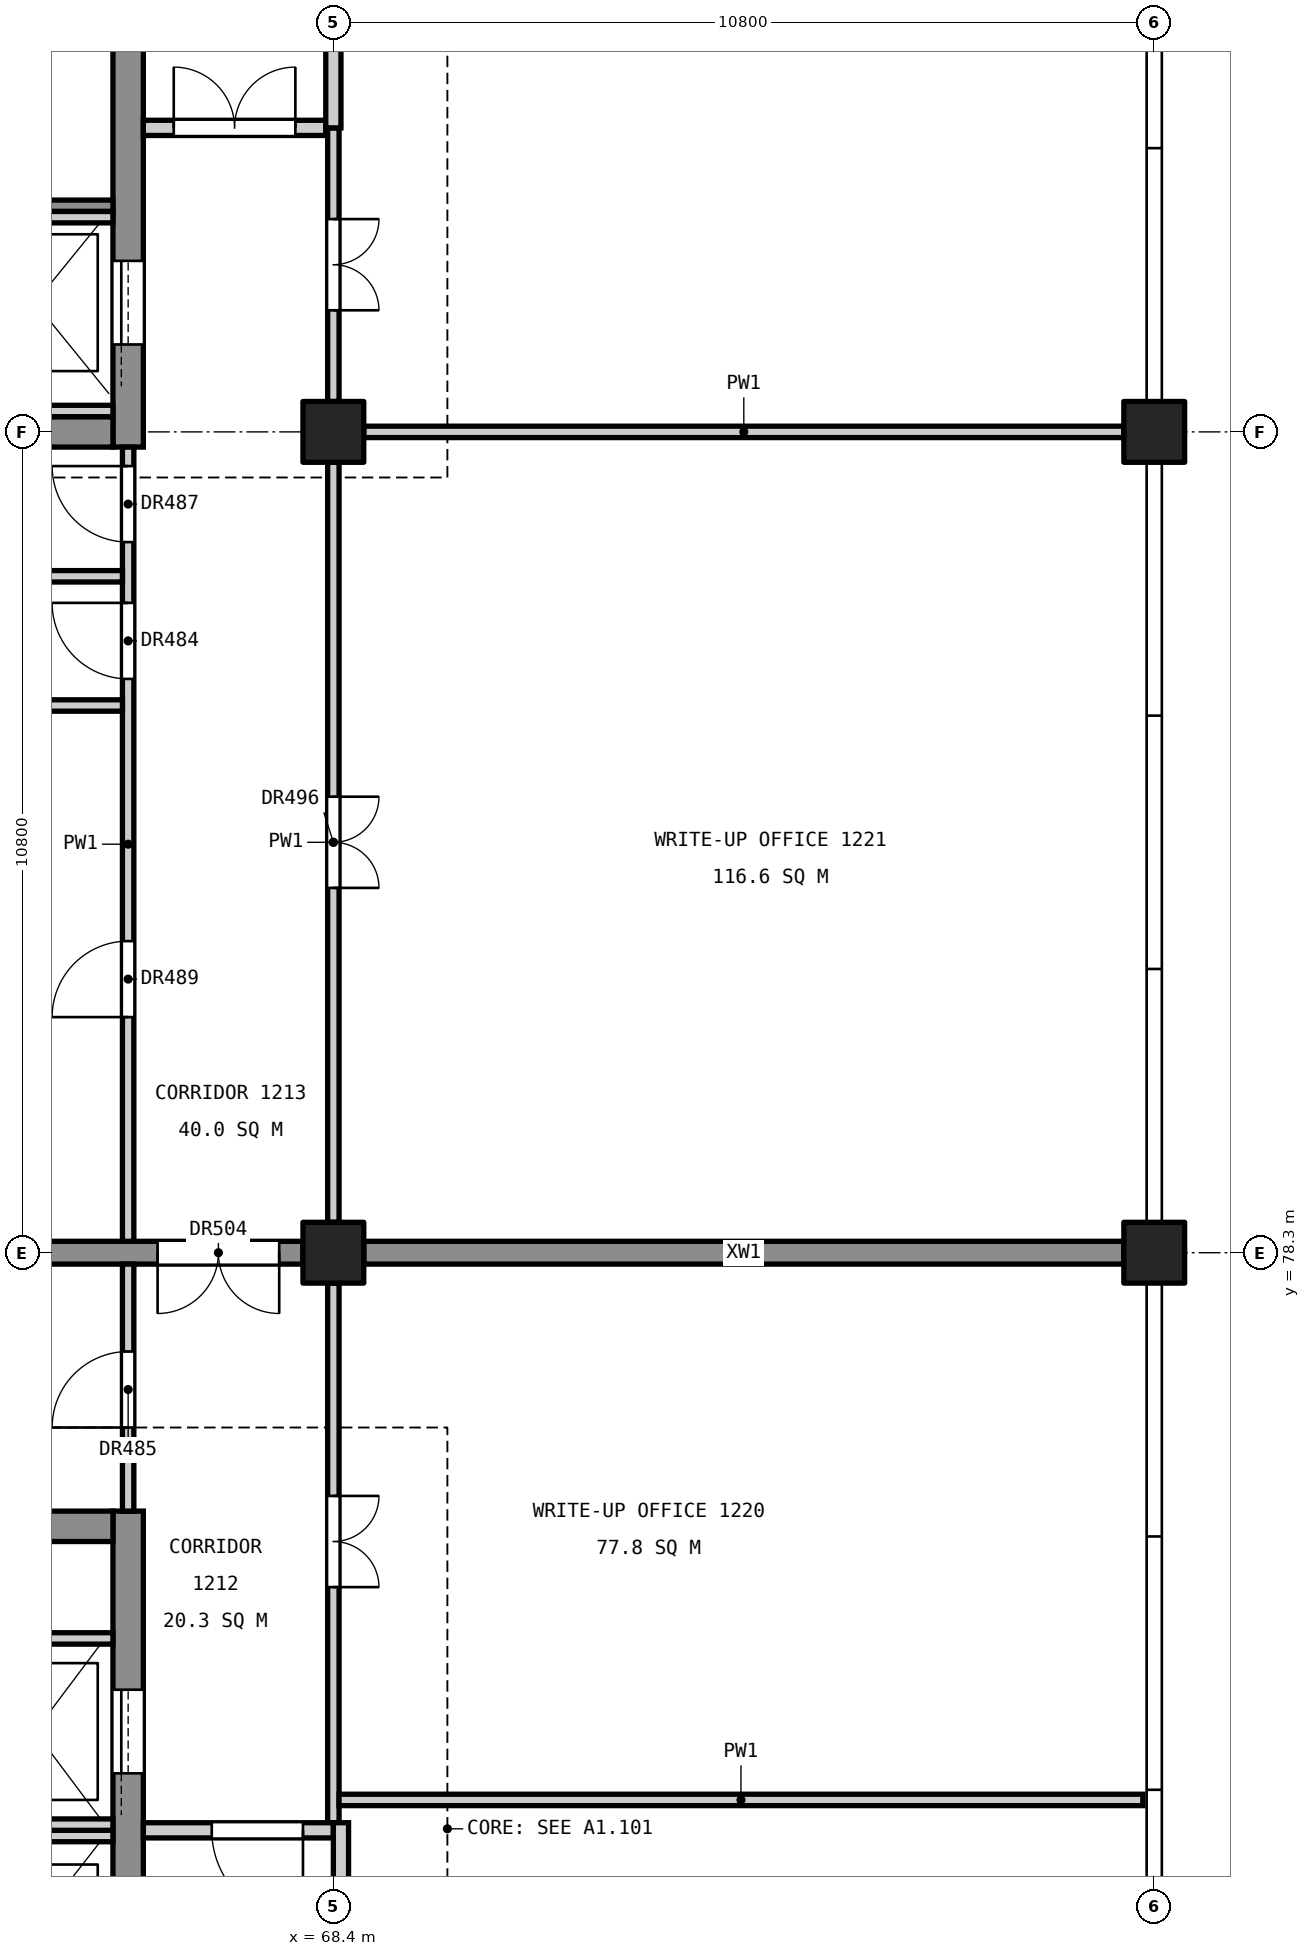
"""IFC4 building model, lengths in metres.
Left out: names, types, materials, properties, quantities, classifications, styles, units other than length and angle.
Written with IfcOpenShell. Run it as: python <this file> out.ifc"""

import sys

from ifc_helpers import new_model, si_unit, direction, frame, frame_2d, origin, origin_2d, place, context, subcontext, project, spatial, rectangle, extrude, element, fill, save


model = new_model("IFC4")
c1 = context("Model", 3, precision=1e-05, world=origin(), true_north=direction((0.0, 1.0)))
c2 = subcontext(c1, "Body", "Model", "MODEL_VIEW")
j1 = project(units=[si_unit("LENGTHUNIT", "METRE"), si_unit("PLANEANGLEUNIT", "RADIAN")], contexts=[c1])
p1 = place(None, origin())
s1 = spatial("IfcSite", under=j1, at=p1, CompositionType="ELEMENT")
p2 = place(p1, origin())
s2 = spatial("IfcBuilding", under=s1, at=p2, CompositionType="ELEMENT")
p3 = place(p2, frame((0.0, 0.0, 60.6)))
s3 = spatial("IfcBuildingStorey", under=s2, at=p3, CompositionType="ELEMENT", Elevation=60.6)
for number, where, z_axis, x_axis in (
    (1, (68.4, 78.3, 0.0), (0.0, 0.0, 1.0), (1.0, 0.0, 0.0)),
    (2, (68.4, 89.1, 0.0), (0.0, 0.0, 1.0), (1.0, 0.0, 0.0)),
    (3, (79.2, 78.3, 0.0), (0.0, 0.0, 1.0), (1.0, 0.0, 0.0)),
    (4, (79.2, 89.1, 0.0), (0.0, 0.0, 1.0), (1.0, 0.0, 0.0)),
):
    element("IfcColumn", number, at=place(p3, frame(where, z_axis=z_axis, x_axis=x_axis)), inside=s3, PredefinedType="COLUMN", context=c2, shape_type="SweptSolid", body=[
        extrude(rectangle(XDim=0.8, YDim=0.8, at=origin_2d()), origin(), (0.0, 0.0, 1.0), 4.8),
    ])
p4 = place(p3, frame((65.7, 60.1, 0.0), z_axis=(0.0, 0.0, 1.0), x_axis=(0.0, 1.0, 0.0)))
e5 = element("IfcWall", 5, at=p4, inside=s3, PredefinedType="SHEAR", context=c2, shape_type="SweptSolid", body=[
    extrude(rectangle(XDim=14.8, YDim=0.4, at=frame_2d((7.4, 0.0))), origin(), (0.0, 0.0, 1.0), 4.55),
])
p5 = place(p4, frame((0.5, 0.0, 0.0)))
e6 = element("IfcOpeningElement", 6, at=p5, cuts=e5, PredefinedType="OPENING", context=c2, shape_type="SweptSolid", body=[
    extrude(rectangle(XDim=1.4, YDim=2.1, at=frame_2d((0.7, 1.05))), frame((0.0, 0.21, 0.0), z_axis=(0.0, -1.0, 0.0), x_axis=(1.0, 0.0, 0.0)), (0.0, 0.0, 1.0), 0.42),
])
p6 = place(p4, frame((8.8, 0.0, 0.0)))
e7 = element("IfcOpeningElement", 7, at=p6, cuts=e5, PredefinedType="OPENING", context=c2, shape_type="SweptSolid", body=[
    extrude(rectangle(XDim=1.1, YDim=2.1, at=frame_2d((0.55, 1.05))), frame((0.0, 0.21, 0.0), z_axis=(0.0, -1.0, 0.0), x_axis=(1.0, 0.0, 0.0)), (0.0, 0.0, 1.0), 0.42),
])
p7 = place(p4, frame((11.35, 0.0, 0.0)))
e8 = element("IfcOpeningElement", 8, at=p7, cuts=e5, PredefinedType="OPENING", context=c2, shape_type="SweptSolid", body=[
    extrude(rectangle(XDim=1.1, YDim=2.1, at=frame_2d((0.55, 1.05))), frame((0.0, 0.21, 0.0), z_axis=(0.0, -1.0, 0.0), x_axis=(1.0, 0.0, 0.0)), (0.0, 0.0, 1.0), 0.42),
])
p8 = place(p3, frame((61.4, 74.7, 0.0), z_axis=(0.0, 0.0, 1.0), x_axis=(1.0, 0.0, 0.0)))
e9 = element("IfcWall", 9, at=p8, inside=s3, PredefinedType="SHEAR", context=c2, shape_type="SweptSolid", body=[
    extrude(rectangle(XDim=4.1, YDim=0.4, at=frame_2d((2.05, 0.0))), origin(), (0.0, 0.0, 1.0), 4.55),
])
p9 = place(p3, frame((65.7, 88.9, 0.0), z_axis=(0.0, 0.0, 1.0), x_axis=(0.0, 1.0, 0.0)))
e10 = element("IfcWall", 10, at=p9, inside=s3, PredefinedType="SHEAR", context=c2, shape_type="SweptSolid", body=[
    extrude(rectangle(XDim=11.2, YDim=0.4, at=frame_2d((5.6, 0.0))), origin(), (0.0, 0.0, 1.0), 4.55),
])
p10 = place(p9, frame((9.3, 0.0, 0.0)))
e11 = element("IfcOpeningElement", 11, at=p10, cuts=e10, PredefinedType="OPENING", context=c2, shape_type="SweptSolid", body=[
    extrude(rectangle(XDim=1.4, YDim=2.1, at=frame_2d((0.7, 1.05))), frame((0.0, 0.21, 0.0), z_axis=(0.0, -1.0, 0.0), x_axis=(1.0, 0.0, 0.0)), (0.0, 0.0, 1.0), 0.42),
])
p11 = place(p9, frame((1.35, 0.0, 0.0)))
e12 = element("IfcOpeningElement", 12, at=p11, cuts=e10, PredefinedType="OPENING", context=c2, shape_type="SweptSolid", body=[
    extrude(rectangle(XDim=1.1, YDim=2.1, at=frame_2d((0.55, 1.05))), frame((0.0, 0.21, 0.0), z_axis=(0.0, -1.0, 0.0), x_axis=(1.0, 0.0, 0.0)), (0.0, 0.0, 1.0), 0.42),
])
p12 = place(p3, frame((61.4, 89.1, 0.0), z_axis=(0.0, 0.0, 1.0), x_axis=(1.0, 0.0, 0.0)))
e13 = element("IfcWall", 13, at=p12, inside=s3, PredefinedType="SHEAR", context=c2, shape_type="SweptSolid", body=[
    extrude(rectangle(XDim=4.1, YDim=0.4, at=frame_2d((2.05, 0.0))), origin(), (0.0, 0.0, 1.0), 4.55),
])
p13 = place(p3, frame((61.6, 78.3, 0.0), z_axis=(0.0, 0.0, 1.0), x_axis=(1.0, 0.0, 0.0)))
e14 = element("IfcWall", 14, at=p13, inside=s3, PredefinedType="SHEAR", context=c2, shape_type="SweptSolid", body=[
    extrude(rectangle(XDim=6.4, YDim=0.3, at=frame_2d((3.2, 0.0))), origin(), (0.0, 0.0, 1.0), 4.55),
])
p14 = place(p13, frame((4.488, 0.0, 0.0)))
e15 = element("IfcOpeningElement", 15, at=p14, cuts=e14, PredefinedType="OPENING", context=c2, shape_type="SweptSolid", body=[
    extrude(rectangle(XDim=1.6, YDim=2.1, at=frame_2d((0.8, 1.05))), frame((0.0, 0.16, 0.0), z_axis=(0.0, -1.0, 0.0), x_axis=(1.0, 0.0, 0.0)), (0.0, 0.0, 1.0), 0.32),
])
p15 = place(p3, frame((68.8, 78.3, 0.0), z_axis=(0.0, 0.0, 1.0), x_axis=(1.0, 0.0, 0.0)))
e16 = element("IfcWall", 16, at=p15, inside=s3, PredefinedType="SHEAR", context=c2, shape_type="SweptSolid", body=[
    extrude(rectangle(XDim=10.0, YDim=0.3, at=frame_2d((5.0, 0.0))), origin(), (0.0, 0.0, 1.0), 4.55),
])
p16 = place(p3, frame((61.4, 92.075, 0.0), z_axis=(0.0, 0.0, 1.0), x_axis=(1.0, 0.0, 0.0)))
e17 = element("IfcWall", 17, at=p16, inside=s3, PredefinedType="SOLIDWALL", context=c2, shape_type="SweptSolid", body=[
    extrude(rectangle(XDim=4.1, YDim=0.15, at=frame_2d((2.05, 0.0))), origin(), (0.0, 0.0, 1.0), 4.55),
])
for number, where, z_axis, x_axis in (
    (18, (63.65, 70.625, 0.0), (0.0, 0.0, 1.0), (1.0, 0.0, 0.0)),
    (19, (63.65, 70.775, 0.0), (0.0, 0.0, 1.0), (1.0, 0.0, 0.0)),
    (20, (63.65, 73.225, 0.0), (0.0, 0.0, 1.0), (1.0, 0.0, 0.0)),
    (21, (63.65, 91.925, 0.0), (0.0, 0.0, 1.0), (1.0, 0.0, 0.0)),
    (22, (63.65, 89.375, 0.0), (0.0, 0.0, 1.0), (1.0, 0.0, 0.0)),
):
    element("IfcWall", number, at=place(p3, frame(where, z_axis=z_axis, x_axis=x_axis)), inside=s3, PredefinedType="SOLIDWALL", context=c2, shape_type="SweptSolid", body=[
        extrude(rectangle(XDim=1.85, YDim=0.15, at=frame_2d((0.925, 0.0))), origin(), (0.0, 0.0, 1.0), 4.8),
    ])
p17 = place(p3, frame((65.7, 74.9, 0.0), z_axis=(0.0, 0.0, 1.0), x_axis=(0.0, 1.0, 0.0)))
e23 = element("IfcWall", 23, at=p17, inside=s3, PredefinedType="PARTITIONING", context=c2, shape_type="SweptSolid", body=[
    extrude(rectangle(XDim=3.25, YDim=0.15, at=frame_2d((1.625, 0.0))), origin(), (0.0, 0.0, 1.0), 3.55),
])
p18 = place(p17, frame((1.1, 0.0, 0.0)))
e24 = element("IfcOpeningElement", 24, at=p18, cuts=e23, PredefinedType="OPENING", context=c2, shape_type="SweptSolid", body=[
    extrude(rectangle(XDim=1.0, YDim=2.1, at=frame_2d((0.5, 1.05))), frame((0.0, 0.085, 0.0), z_axis=(0.0, -1.0, 0.0), x_axis=(1.0, 0.0, 0.0)), (0.0, 0.0, 1.0), 0.17),
])
p19 = place(p3, frame((65.7, 78.45, 0.0), z_axis=(0.0, 0.0, 1.0), x_axis=(0.0, 1.0, 0.0)))
e25 = element("IfcWall", 25, at=p19, inside=s3, PredefinedType="PARTITIONING", context=c2, shape_type="SweptSolid", body=[
    extrude(rectangle(XDim=10.45, YDim=0.15, at=frame_2d((5.225, 0.0))), origin(), (0.0, 0.0, 1.0), 3.55),
])
p20 = place(p19, frame((7.4, 0.0, 0.0)))
e26 = element("IfcOpeningElement", 26, at=p20, cuts=e25, PredefinedType="OPENING", context=c2, shape_type="SweptSolid", body=[
    extrude(rectangle(XDim=1.0, YDim=2.1, at=frame_2d((0.5, 1.05))), frame((0.0, 0.085, 0.0), z_axis=(0.0, -1.0, 0.0), x_axis=(1.0, 0.0, 0.0)), (0.0, 0.0, 1.0), 0.17),
])
p21 = place(p19, frame((9.2, 0.0, 0.0)))
e27 = element("IfcOpeningElement", 27, at=p21, cuts=e25, PredefinedType="OPENING", context=c2, shape_type="SweptSolid", body=[
    extrude(rectangle(XDim=1.0, YDim=2.1, at=frame_2d((0.5, 1.05))), frame((0.0, 0.085, 0.0), z_axis=(0.0, -1.0, 0.0), x_axis=(1.0, 0.0, 0.0)), (0.0, 0.0, 1.0), 0.17),
])
p22 = place(p19, frame((2.95, 0.0, 0.0)))
e28 = element("IfcOpeningElement", 28, at=p22, cuts=e25, PredefinedType="OPENING", context=c2, shape_type="SweptSolid", body=[
    extrude(rectangle(XDim=1.0, YDim=2.1, at=frame_2d((0.5, 1.05))), frame((0.0, 0.085, 0.0), z_axis=(0.0, -1.0, 0.0), x_axis=(1.0, 0.0, 0.0)), (0.0, 0.0, 1.0), 0.17),
])
p23 = place(p3, frame((61.35, 85.5, 0.0), z_axis=(0.0, 0.0, 1.0), x_axis=(1.0, 0.0, 0.0)))
e29 = element("IfcWall", 29, at=p23, inside=s3, PredefinedType="PARTITIONING", context=c2, shape_type="SweptSolid", body=[
    extrude(rectangle(XDim=4.275, YDim=0.15, at=frame_2d((2.137, 0.0))), origin(), (0.0, 0.0, 1.0), 3.85),
])
p24 = place(p3, frame((61.35, 87.2, 0.0), z_axis=(0.0, 0.0, 1.0), x_axis=(1.0, 0.0, 0.0)))
e30 = element("IfcWall", 30, at=p24, inside=s3, PredefinedType="PARTITIONING", context=c2, shape_type="SweptSolid", body=[
    extrude(rectangle(XDim=4.275, YDim=0.15, at=frame_2d((2.137, 0.0))), origin(), (0.0, 0.0, 1.0), 3.55),
])
p25 = place(p3, frame((65.9, 93.1, 0.0), z_axis=(0.0, 0.0, 1.0), x_axis=(1.0, 0.0, 0.0)))
e31 = element("IfcWall", 31, at=p25, inside=s3, PredefinedType="PARTITIONING", context=c2, shape_type="SweptSolid", body=[
    extrude(rectangle(XDim=2.4, YDim=0.2, at=frame_2d((1.2, 0.0))), origin(), (0.0, 0.0, 1.0), 3.55),
])
p26 = place(p25, frame((0.4, 0.0, 0.0)))
e32 = element("IfcOpeningElement", 32, at=p26, cuts=e31, PredefinedType="OPENING", context=c2, shape_type="SweptSolid", body=[
    extrude(rectangle(XDim=1.6, YDim=2.1, at=frame_2d((0.8, 1.05))), frame((0.0, 0.11, 0.0), z_axis=(0.0, -1.0, 0.0), x_axis=(1.0, 0.0, 0.0)), (0.0, 0.0, 1.0), 0.22),
])
p27 = place(p3, frame((68.4, 70.8, 0.0), z_axis=(0.0, 0.0, 1.0), x_axis=(0.0, 1.0, 0.0)))
e33 = element("IfcWall", 33, at=p27, inside=s3, PredefinedType="PARTITIONING", context=c2, shape_type="SweptSolid", body=[
    extrude(rectangle(XDim=7.1, YDim=0.15, at=frame_2d((3.55, 0.0))), origin(), (0.0, 0.0, 1.0), 3.55),
])
p28 = place(p27, frame((3.1, 0.0, 0.0)))
e34 = element("IfcOpeningElement", 34, at=p28, cuts=e33, PredefinedType="OPENING", context=c2, shape_type="SweptSolid", body=[
    extrude(rectangle(XDim=1.2, YDim=2.1, at=frame_2d((0.6, 1.05))), frame((0.0, 0.085, 0.0), z_axis=(0.0, -1.0, 0.0), x_axis=(1.0, 0.0, 0.0)), (0.0, 0.0, 1.0), 0.17),
])
p29 = place(p3, frame((68.4, 78.7, 0.0), z_axis=(0.0, 0.0, 1.0), x_axis=(0.0, 1.0, 0.0)))
e35 = element("IfcWall", 35, at=p29, inside=s3, PredefinedType="PARTITIONING", context=c2, shape_type="SweptSolid", body=[
    extrude(rectangle(XDim=10.0, YDim=0.15, at=frame_2d((5.0, 0.0))), origin(), (0.0, 0.0, 1.0), 3.55),
])
p30 = place(p29, frame((4.4, 0.0, 0.0)))
e36 = element("IfcOpeningElement", 36, at=p30, cuts=e35, PredefinedType="OPENING", context=c2, shape_type="SweptSolid", body=[
    extrude(rectangle(XDim=1.2, YDim=2.1, at=frame_2d((0.6, 1.05))), frame((0.0, 0.085, 0.0), z_axis=(0.0, -1.0, 0.0), x_axis=(1.0, 0.0, 0.0)), (0.0, 0.0, 1.0), 0.17),
])
p31 = place(p3, frame((68.4, 89.5, 0.0), z_axis=(0.0, 0.0, 1.0), x_axis=(0.0, 1.0, 0.0)))
e37 = element("IfcWall", 37, at=p31, inside=s3, PredefinedType="PARTITIONING", context=c2, shape_type="SweptSolid", body=[
    extrude(rectangle(XDim=3.6, YDim=0.15, at=frame_2d((1.8, 0.0))), origin(), (0.0, 0.0, 1.0), 3.55),
])
p32 = place(p31, frame((1.2, 0.0, 0.0)))
e38 = element("IfcOpeningElement", 38, at=p32, cuts=e37, PredefinedType="OPENING", context=c2, shape_type="SweptSolid", body=[
    extrude(rectangle(XDim=1.2, YDim=2.1, at=frame_2d((0.6, 1.05))), frame((0.0, 0.085, 0.0), z_axis=(0.0, -1.0, 0.0), x_axis=(1.0, 0.0, 0.0)), (0.0, 0.0, 1.0), 0.17),
])
p33 = place(p3, frame((68.4, 93.1, 0.0), z_axis=(0.0, 0.0, 1.0), x_axis=(0.0, 1.0, 0.0)))
e39 = element("IfcWall", 39, at=p33, inside=s3, PredefinedType="PARTITIONING", context=c2, shape_type="SweptSolid", body=[
    extrude(rectangle(XDim=6.4, YDim=0.2, at=frame_2d((3.2, 0.0))), origin(), (0.0, 0.0, 1.0), 3.55),
])
p34 = place(p3, frame((65.9, 70.7, 0.0), z_axis=(0.0, 0.0, 1.0), x_axis=(1.0, 0.0, 0.0)))
e40 = element("IfcWall", 40, at=p34, inside=s3, PredefinedType="PARTITIONING", context=c2, shape_type="SweptSolid", body=[
    extrude(rectangle(XDim=2.5, YDim=0.2, at=frame_2d((1.25, 0.0))), origin(), (0.0, 0.0, 1.0), 3.55),
])
p35 = place(p34, frame((0.9, 0.0, 0.0)))
e41 = element("IfcOpeningElement", 41, at=p35, cuts=e40, PredefinedType="OPENING", context=c2, shape_type="SweptSolid", body=[
    extrude(rectangle(XDim=1.2, YDim=2.1, at=frame_2d((0.6, 1.05))), frame((0.0, 0.11, 0.0), z_axis=(0.0, -1.0, 0.0), x_axis=(1.0, 0.0, 0.0)), (0.0, 0.0, 1.0), 0.22),
])
p36 = place(p3, frame((68.5, 67.9, 0.0), z_axis=(0.0, 0.0, 1.0), x_axis=(0.0, 1.0, 0.0)))
e42 = element("IfcWall", 42, at=p36, inside=s3, PredefinedType="PARTITIONING", context=c2, shape_type="SweptSolid", body=[
    extrude(rectangle(XDim=2.9, YDim=0.2, at=frame_2d((1.45, 0.0))), origin(), (0.0, 0.0, 1.0), 3.55),
])
p37 = place(p3, frame((68.475, 71.1, 0.0), z_axis=(0.0, 0.0, 1.0), x_axis=(1.0, 0.0, 0.0)))
e43 = element("IfcWall", 43, at=p37, inside=s3, PredefinedType="PARTITIONING", context=c2, shape_type="SweptSolid", body=[
    extrude(rectangle(XDim=10.575, YDim=0.15, at=frame_2d((5.288, 0.0))), origin(), (0.0, 0.0, 1.0), 3.85),
])
p38 = place(p3, frame((68.8, 89.1, 0.0), z_axis=(0.0, 0.0, 1.0), x_axis=(1.0, 0.0, 0.0)))
e44 = element("IfcWall", 44, at=p38, inside=s3, PredefinedType="PARTITIONING", context=c2, shape_type="SweptSolid", body=[
    extrude(rectangle(XDim=10.0, YDim=0.15, at=frame_2d((5.0, 0.0))), origin(), (0.0, 0.0, 1.0), 3.85),
])
p39 = place(p7, origin())
e45 = element("IfcDoor", 45, at=p39, inside=s3, OperationType="SLIDING_TO_LEFT", PredefinedType="DOOR", context=c2, shape_type="SweptSolid", body=[
    extrude(rectangle(XDim=1.1, YDim=2.1, at=frame_2d((0.55, 1.05))), frame((0.0, 0.025, 0.0), z_axis=(0.0, -1.0, 0.0), x_axis=(1.0, 0.0, 0.0)), (0.0, 0.0, 1.0), 0.05),
])
fill(e8, e45)
p40 = place(p11, origin())
e46 = element("IfcDoor", 46, at=p40, inside=s3, OperationType="SLIDING_TO_LEFT", PredefinedType="DOOR", context=c2, shape_type="SweptSolid", body=[
    extrude(rectangle(XDim=1.1, YDim=2.1, at=frame_2d((0.55, 1.05))), frame((0.0, 0.025, 0.0), z_axis=(0.0, -1.0, 0.0), x_axis=(1.0, 0.0, 0.0)), (0.0, 0.0, 1.0), 0.05),
])
fill(e12, e46)
p41 = place(p20, origin())
e47 = element("IfcDoor", 47, at=p41, inside=s3, OperationType="SINGLE_SWING_RIGHT", PredefinedType="DOOR", context=c2, shape_type="SweptSolid", body=[
    extrude(rectangle(XDim=1.0, YDim=2.1, at=frame_2d((0.5, 1.05))), frame((0.0, 0.025, 0.0), z_axis=(0.0, -1.0, 0.0), x_axis=(1.0, 0.0, 0.0)), (0.0, 0.0, 1.0), 0.05),
])
fill(e26, e47)
p42 = place(p18, origin())
e48 = element("IfcDoor", 48, at=p42, inside=s3, OperationType="SINGLE_SWING_LEFT", PredefinedType="DOOR", context=c2, shape_type="SweptSolid", body=[
    extrude(rectangle(XDim=1.0, YDim=2.1, at=frame_2d((0.5, 1.05))), frame((0.0, 0.025, 0.0), z_axis=(0.0, -1.0, 0.0), x_axis=(1.0, 0.0, 0.0)), (0.0, 0.0, 1.0), 0.05),
])
fill(e24, e48)
p43 = place(p21, origin())
e49 = element("IfcDoor", 49, at=p43, inside=s3, OperationType="SINGLE_SWING_RIGHT", PredefinedType="DOOR", context=c2, shape_type="SweptSolid", body=[
    extrude(rectangle(XDim=1.0, YDim=2.1, at=frame_2d((0.5, 1.05))), frame((0.0, 0.025, 0.0), z_axis=(0.0, -1.0, 0.0), x_axis=(1.0, 0.0, 0.0)), (0.0, 0.0, 1.0), 0.05),
])
fill(e27, e49)
p44 = place(p22, origin())
e50 = element("IfcDoor", 50, at=p44, inside=s3, OperationType="SINGLE_SWING_LEFT", PredefinedType="DOOR", context=c2, shape_type="SweptSolid", body=[
    extrude(rectangle(XDim=1.0, YDim=2.1, at=frame_2d((0.5, 1.05))), frame((0.0, 0.025, 0.0), z_axis=(0.0, -1.0, 0.0), x_axis=(1.0, 0.0, 0.0)), (0.0, 0.0, 1.0), 0.05),
])
fill(e28, e50)
p45 = place(p28, frame((1.2, 0.0, 0.0), z_axis=(0.0, 0.0, 1.0), x_axis=(-1.0, 0.0, 0.0)))
e51 = element("IfcDoor", 51, at=p45, inside=s3, OperationType="DOUBLE_DOOR_SINGLE_SWING", PredefinedType="DOOR", context=c2, shape_type="SweptSolid", body=[
    extrude(rectangle(XDim=1.2, YDim=2.1, at=frame_2d((0.6, 1.05))), frame((0.0, 0.025, 0.0), z_axis=(0.0, -1.0, 0.0), x_axis=(1.0, 0.0, 0.0)), (0.0, 0.0, 1.0), 0.05),
])
fill(e34, e51)
p46 = place(p30, frame((1.2, 0.0, 0.0), z_axis=(0.0, 0.0, 1.0), x_axis=(-1.0, 0.0, 0.0)))
e52 = element("IfcDoor", 52, at=p46, inside=s3, OperationType="DOUBLE_DOOR_SINGLE_SWING", PredefinedType="DOOR", context=c2, shape_type="SweptSolid", body=[
    extrude(rectangle(XDim=1.2, YDim=2.1, at=frame_2d((0.6, 1.05))), frame((0.0, 0.025, 0.0), z_axis=(0.0, -1.0, 0.0), x_axis=(1.0, 0.0, 0.0)), (0.0, 0.0, 1.0), 0.05),
])
fill(e36, e52)
p47 = place(p32, frame((1.2, 0.0, 0.0), z_axis=(0.0, 0.0, 1.0), x_axis=(-1.0, 0.0, 0.0)))
e53 = element("IfcDoor", 53, at=p47, inside=s3, OperationType="DOUBLE_DOOR_SINGLE_SWING", PredefinedType="DOOR", context=c2, shape_type="SweptSolid", body=[
    extrude(rectangle(XDim=1.2, YDim=2.1, at=frame_2d((0.6, 1.05))), frame((0.0, 0.025, 0.0), z_axis=(0.0, -1.0, 0.0), x_axis=(1.0, 0.0, 0.0)), (0.0, 0.0, 1.0), 0.05),
])
fill(e38, e53)
p48 = place(p35, frame((1.2, 0.0, 0.0), z_axis=(0.0, 0.0, 1.0), x_axis=(-1.0, 0.0, 0.0)))
e54 = element("IfcDoor", 54, at=p48, inside=s3, OperationType="SINGLE_SWING_LEFT", PredefinedType="DOOR", context=c2, shape_type="SweptSolid", body=[
    extrude(rectangle(XDim=1.2, YDim=2.1, at=frame_2d((0.6, 1.05))), frame((0.0, 0.025, 0.0), z_axis=(0.0, -1.0, 0.0), x_axis=(1.0, 0.0, 0.0)), (0.0, 0.0, 1.0), 0.05),
])
fill(e41, e54)
p49 = place(p26, origin())
e55 = element("IfcDoor", 55, at=p49, inside=s3, OperationType="DOUBLE_DOOR_SINGLE_SWING", PredefinedType="DOOR", context=c2, shape_type="SweptSolid", body=[
    extrude(rectangle(XDim=1.6, YDim=2.1, at=frame_2d((0.8, 1.05))), frame((0.0, 0.025, 0.0), z_axis=(0.0, -1.0, 0.0), x_axis=(1.0, 0.0, 0.0)), (0.0, 0.0, 1.0), 0.05),
])
fill(e32, e55)
p50 = place(p14, frame((1.6, 0.0, 0.0), z_axis=(0.0, 0.0, 1.0), x_axis=(-1.0, 0.0, 0.0)))
e56 = element("IfcDoor", 56, at=p50, inside=s3, OperationType="DOUBLE_DOOR_SINGLE_SWING", PredefinedType="DOOR", context=c2, shape_type="SweptSolid", body=[
    extrude(rectangle(XDim=1.6, YDim=2.1, at=frame_2d((0.8, 1.05))), frame((0.0, 0.025, 0.0), z_axis=(0.0, -1.0, 0.0), x_axis=(1.0, 0.0, 0.0)), (0.0, 0.0, 1.0), 0.05),
])
fill(e15, e56)
save(model, sys.argv[1])
